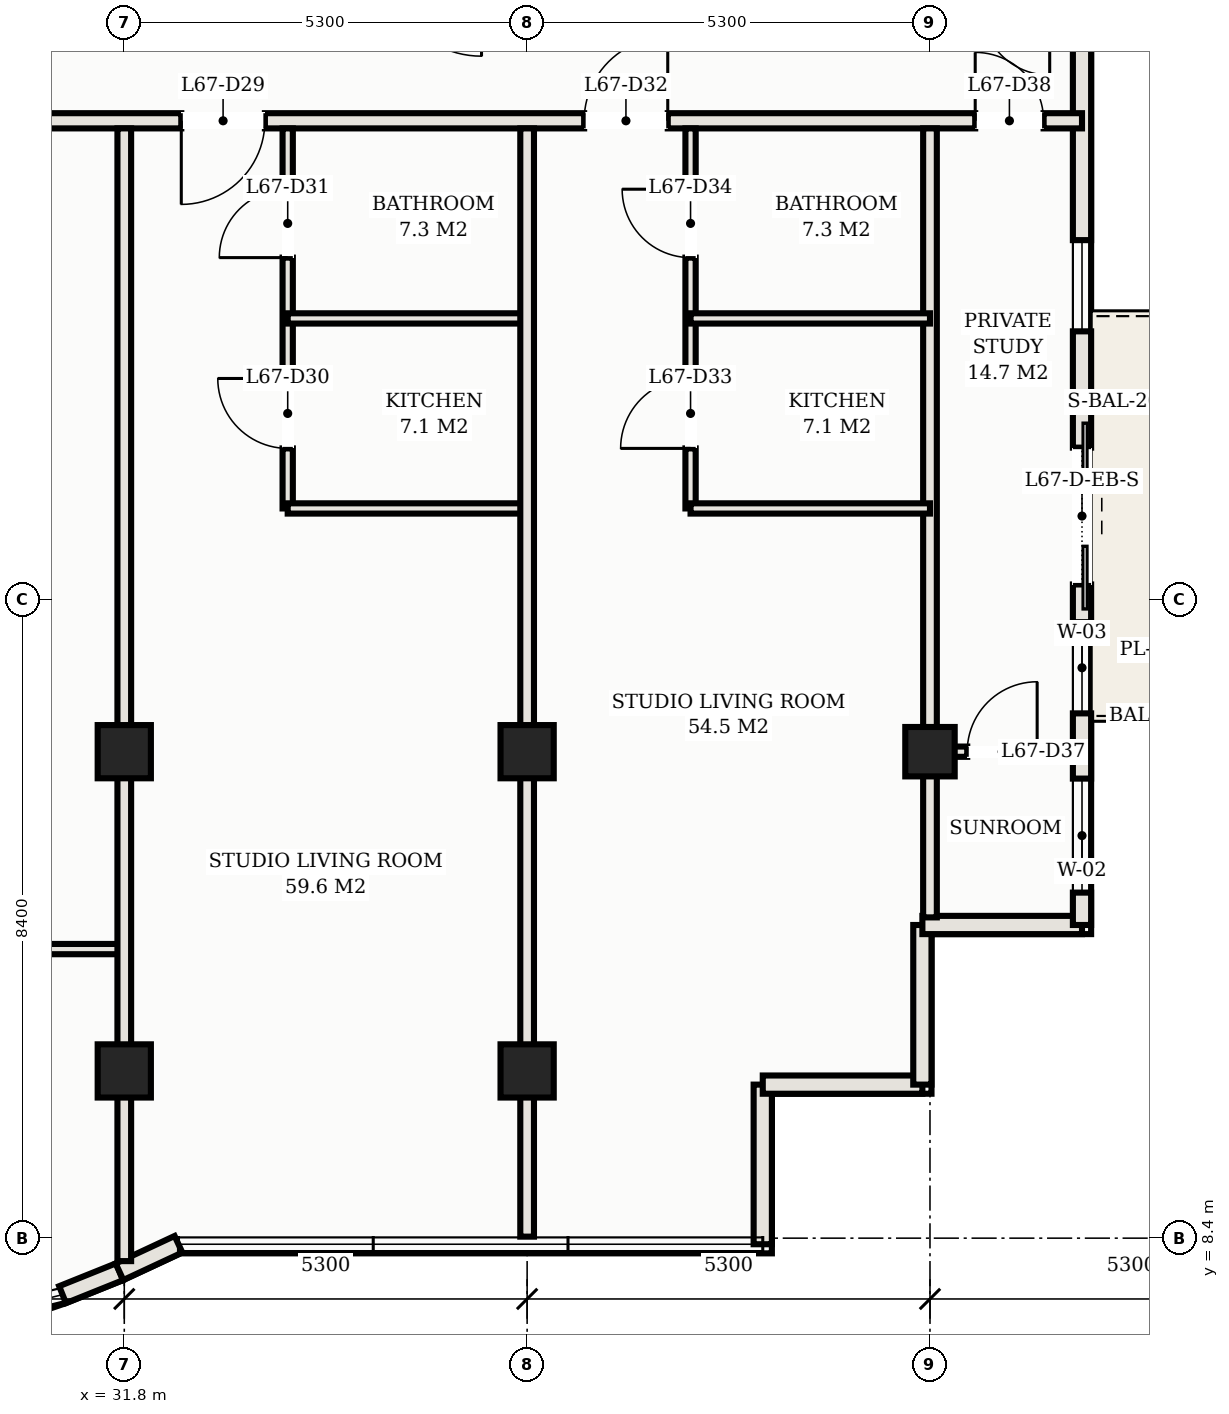
"""IFC4 building model, lengths in metres.
Left out: names, types, materials, properties, quantities, classifications, styles, units other than length and angle.
Written with IfcOpenShell. Run it as: python <this file> out.ifc"""

import sys

from ifc_helpers import new_model, si_unit, direction, frame, frame_2d, origin, origin_2d, place, context, subcontext, project, spatial, rectangle, hollow_rectangle, extrude, element, fill, save


model = new_model("IFC4")
c1 = context("Model", 3, precision=1e-05, world=origin(), true_north=direction((0.0, 1.0)))
c2 = subcontext(c1, "Body", "Model", "MODEL_VIEW")
j1 = project(units=[si_unit("LENGTHUNIT", "METRE"), si_unit("PLANEANGLEUNIT", "RADIAN")], contexts=[c1])
p1 = place(None, origin())
s1 = spatial("IfcSite", under=j1, at=p1, CompositionType="ELEMENT")
p2 = place(p1, origin())
s2 = spatial("IfcBuilding", under=s1, at=p2, CompositionType="ELEMENT")
p3 = place(p2, frame((0.0, 0.0, 242.9)))
s3 = spatial("IfcBuildingStorey", under=s2, at=p3, CompositionType="ELEMENT", Elevation=242.9)
for number, where, z_axis, x_axis in (
    (1, (31.8, 14.8, 0.0), (0.0, 0.0, 1.0), (1.0, 0.0, 0.0)),
    (2, (31.8, 10.6, 0.0), (0.0, 0.0, 1.0), (1.0, 0.0, 0.0)),
    (3, (37.1, 14.8, 0.0), (0.0, 0.0, 1.0), (1.0, 0.0, 0.0)),
    (4, (37.1, 10.6, 0.0), (0.0, 0.0, 1.0), (1.0, 0.0, 0.0)),
):
    element("IfcColumn", number, at=place(p3, frame(where, z_axis=z_axis, x_axis=x_axis)), inside=s3, PredefinedType="COLUMN", context=c2, shape_type="SweptSolid", body=[
        extrude(hollow_rectangle(XDim=0.7, YDim=0.7, WallThickness=0.025, at=origin_2d()), origin(), (0.0, 0.0, 1.0), 3.3),
    ])
p4 = place(p3, frame((42.4, 14.8, 0.0), z_axis=(0.0, 0.0, 1.0), x_axis=(1.0, 0.0, 0.0)))
e5 = element("IfcColumn", 5, at=p4, inside=s3, PredefinedType="COLUMN", context=c2, shape_type="SweptSolid", body=[
    extrude(hollow_rectangle(XDim=0.65, YDim=0.65, WallThickness=0.022, at=origin_2d()), origin(), (0.0, 0.0, 1.0), 3.3),
])
p5 = place(p3, frame((30.988, 7.657, 0.0), z_axis=(0.0, 0.0, 1.0), x_axis=(0.927870589467, 0.372902358805, 0.0)))
e6 = element("IfcWall", 6, at=p5, inside=s3, PredefinedType="SOLIDWALL", context=c2, shape_type="SweptSolid", body=[
    extrude(rectangle(XDim=0.807, YDim=0.24, at=frame_2d((0.404, 0.0))), origin(), (0.0, 0.0, 1.0), 3.11),
])
p6 = place(p3, frame((31.737, 7.958, 0.0), z_axis=(0.0, 0.0, 1.0), x_axis=(0.906190424584, 0.422869855147, 0.0)))
e7 = element("IfcWall", 7, at=p6, inside=s3, PredefinedType="SOLIDWALL", context=c2, shape_type="SweptSolid", body=[
    extrude(rectangle(XDim=0.856, YDim=0.24, at=frame_2d((0.428, 0.0))), origin(), (0.0, 0.0, 1.0), 3.11),
])
p7 = place(p3, frame((40.2, 8.32, 0.0), z_axis=(0.0, 0.0, 1.0), x_axis=(0.0, 1.0, 0.0)))
e8 = element("IfcWall", 8, at=p7, inside=s3, PredefinedType="SOLIDWALL", context=c2, shape_type="SweptSolid", body=[
    extrude(rectangle(XDim=2.1, YDim=0.24, at=frame_2d((1.05, 0.0))), origin(), (0.0, 0.0, 1.0), 3.11),
])
for number, where, z_axis, x_axis in (
    (9, (40.2, 10.42, 0.0), (0.0, 0.0, 1.0), (1.0, 0.0, 0.0)),
    (10, (42.3, 10.42, 0.0), (0.0, 0.0, 1.0), (0.0, 1.0, 0.0)),
):
    element("IfcWall", number, at=place(p3, frame(where, z_axis=z_axis, x_axis=x_axis)), inside=s3, PredefinedType="SOLIDWALL", context=c2, shape_type="SweptSolid", body=[
        extrude(rectangle(XDim=2.1, YDim=0.24, at=frame_2d((1.05, 0.0))), origin(), (0.0, 0.0, 1.0), 3.11),
    ])
p8 = place(p3, frame((42.3, 12.52, 0.0), z_axis=(0.0, 0.0, 1.0), x_axis=(1.0, 0.0, 0.0)))
e11 = element("IfcWall", 11, at=p8, inside=s3, PredefinedType="SOLIDWALL", context=c2, shape_type="SweptSolid", body=[
    extrude(rectangle(XDim=2.1, YDim=0.24, at=frame_2d((1.05, 0.0))), origin(), (0.0, 0.0, 1.0), 3.11),
])
p9 = place(p3, frame((44.4, 12.52, 0.0), z_axis=(0.0, 0.0, 1.0), x_axis=(0.0, 1.0, 0.0)))
e12 = element("IfcWall", 12, at=p9, inside=s3, PredefinedType="SOLIDWALL", context=c2, shape_type="SweptSolid", body=[
    extrude(rectangle(XDim=26.01, YDim=0.24, at=frame_2d((13.005, 0.0))), origin(), (0.0, 0.0, 1.0), 3.11),
])
p10 = place(p9, frame((4.48, 0.0, 0.0)))
e13 = element("IfcOpeningElement", 13, at=p10, cuts=e12, PredefinedType="OPENING", context=c2, shape_type="SweptSolid", body=[
    extrude(rectangle(XDim=1.8, YDim=2.2, at=frame_2d((0.9, 1.1))), frame((0.0, 0.13, 0.0), z_axis=(0.0, -1.0, 0.0), x_axis=(1.0, 0.0, 0.0)), (0.0, 0.0, 1.0), 0.26),
])
p11 = place(p9, frame((0.426, 0.0, 0.75)))
e14 = element("IfcOpeningElement", 14, at=p11, cuts=e12, PredefinedType="OPENING", context=c2, shape_type="SweptSolid", body=[
    extrude(rectangle(XDim=1.5, YDim=1.6, at=frame_2d((0.75, 0.8))), frame((0.0, 0.13, 0.0), z_axis=(0.0, -1.0, 0.0), x_axis=(1.0, 0.0, 0.0)), (0.0, 0.0, 1.0), 0.26),
])
p12 = place(p9, frame((2.784, 0.0, 0.75)))
e15 = element("IfcOpeningElement", 15, at=p12, cuts=e12, PredefinedType="OPENING", context=c2, shape_type="SweptSolid", body=[
    extrude(rectangle(XDim=1.2, YDim=1.5, at=frame_2d((0.6, 0.75))), frame((0.0, 0.13, 0.0), z_axis=(0.0, -1.0, 0.0), x_axis=(1.0, 0.0, 0.0)), (0.0, 0.0, 1.0), 0.26),
])
p13 = place(p9, frame((7.81, 0.0, 0.75)))
e16 = element("IfcOpeningElement", 16, at=p13, cuts=e12, PredefinedType="OPENING", context=c2, shape_type="SweptSolid", body=[
    extrude(rectangle(XDim=1.2, YDim=1.5, at=frame_2d((0.6, 0.75))), frame((0.0, 0.13, 0.0), z_axis=(0.0, -1.0, 0.0), x_axis=(1.0, 0.0, 0.0)), (0.0, 0.0, 1.0), 0.26),
])
p14 = place(p9, frame((18.425, 0.0, 0.75)))
e17 = element("IfcOpeningElement", 17, at=p14, cuts=e12, PredefinedType="OPENING", context=c2, shape_type="SweptSolid", body=[
    extrude(rectangle(XDim=1.2, YDim=1.5, at=frame_2d((0.6, 0.75))), frame((0.0, 0.13, 0.0), z_axis=(0.0, -1.0, 0.0), x_axis=(1.0, 0.0, 0.0)), (0.0, 0.0, 1.0), 0.26),
])
p15 = place(p3, frame((8.6, 23.1, 0.0), z_axis=(0.0, 0.0, 1.0), x_axis=(1.0, 0.0, 0.0)))
e18 = element("IfcWall", 18, at=p15, inside=s3, PredefinedType="PARTITIONING", context=c2, shape_type="SweptSolid", body=[
    extrude(rectangle(XDim=35.8, YDim=0.2, at=frame_2d((17.9, 0.0))), origin(), (0.0, 0.0, 1.0), 2.45),
])
p16 = place(p15, frame((2.75, 0.0, 0.0)))
e19 = element("IfcOpeningElement", 19, at=p16, cuts=e18, PredefinedType="OPENING", context=c2, shape_type="SweptSolid", body=[
    extrude(rectangle(XDim=1.1, YDim=2.25, at=frame_2d((0.55, 1.125))), frame((0.0, 0.11, 0.0), z_axis=(0.0, -1.0, 0.0), x_axis=(1.0, 0.0, 0.0)), (0.0, 0.0, 1.0), 0.22),
])
p17 = place(p15, frame((13.35, 0.0, 0.0)))
e20 = element("IfcOpeningElement", 20, at=p17, cuts=e18, PredefinedType="OPENING", context=c2, shape_type="SweptSolid", body=[
    extrude(rectangle(XDim=1.1, YDim=2.25, at=frame_2d((0.55, 1.125))), frame((0.0, 0.11, 0.0), z_axis=(0.0, -1.0, 0.0), x_axis=(1.0, 0.0, 0.0)), (0.0, 0.0, 1.0), 0.22),
])
p18 = place(p15, frame((23.95, 0.0, 0.0)))
e21 = element("IfcOpeningElement", 21, at=p18, cuts=e18, PredefinedType="OPENING", context=c2, shape_type="SweptSolid", body=[
    extrude(rectangle(XDim=1.1, YDim=2.25, at=frame_2d((0.55, 1.125))), frame((0.0, 0.11, 0.0), z_axis=(0.0, -1.0, 0.0), x_axis=(1.0, 0.0, 0.0)), (0.0, 0.0, 1.0), 0.22),
])
p19 = place(p15, frame((29.25, 0.0, 0.0)))
e22 = element("IfcOpeningElement", 22, at=p19, cuts=e18, PredefinedType="OPENING", context=c2, shape_type="SweptSolid", body=[
    extrude(rectangle(XDim=1.1, YDim=2.25, at=frame_2d((0.55, 1.125))), frame((0.0, 0.11, 0.0), z_axis=(0.0, -1.0, 0.0), x_axis=(1.0, 0.0, 0.0)), (0.0, 0.0, 1.0), 0.22),
])
p20 = place(p15, frame((0.505, 0.0, 0.0)))
e23 = element("IfcOpeningElement", 23, at=p20, cuts=e18, PredefinedType="OPENING", context=c2, shape_type="SweptSolid", body=[
    extrude(rectangle(XDim=0.9, YDim=2.15, at=frame_2d((0.45, 1.075))), frame((0.0, 0.11, 0.0), z_axis=(0.0, -1.0, 0.0), x_axis=(1.0, 0.0, 0.0)), (0.0, 0.0, 1.0), 0.22),
])
p21 = place(p15, frame((34.395, 0.0, 0.0)))
e24 = element("IfcOpeningElement", 24, at=p21, cuts=e18, PredefinedType="OPENING", context=c2, shape_type="SweptSolid", body=[
    extrude(rectangle(XDim=0.9, YDim=2.15, at=frame_2d((0.45, 1.075))), frame((0.0, 0.11, 0.0), z_axis=(0.0, -1.0, 0.0), x_axis=(1.0, 0.0, 0.0)), (0.0, 0.0, 1.0), 0.22),
])
p22 = place(p3, frame((42.4, 12.62, 0.0), z_axis=(0.0, 0.0, 1.0), x_axis=(0.0, 1.0, 0.0)))
e25 = element("IfcWall", 25, at=p22, inside=s3, PredefinedType="PARTITIONING", context=c2, shape_type="SweptSolid", body=[
    extrude(rectangle(XDim=10.38, YDim=0.18, at=frame_2d((5.19, 0.0))), origin(), (0.0, 0.0, 1.0), 2.45),
])
p23 = place(p3, frame((21.2, 12.203, 0.0), z_axis=(0.0, 0.0, 1.0), x_axis=(1.0, 0.0, 0.0)))
e26 = element("IfcWall", 26, at=p23, inside=s3, PredefinedType="PARTITIONING", context=c2, shape_type="SweptSolid", body=[
    extrude(rectangle(XDim=10.6, YDim=0.135, at=frame_2d((5.3, 0.0))), origin(), (0.0, 0.0, 1.0), 2.45),
])
p24 = place(p23, frame((0.615, 0.0, 0.0)))
e27 = element("IfcOpeningElement", 27, at=p24, cuts=e26, PredefinedType="OPENING", context=c2, shape_type="SweptSolid", body=[
    extrude(rectangle(XDim=0.92, YDim=2.15, at=frame_2d((0.46, 1.075))), frame((0.0, 0.078, 0.0), z_axis=(0.0, -1.0, 0.0), x_axis=(1.0, 0.0, 0.0)), (0.0, 0.0, 1.0), 0.155),
])
p25 = place(p3, frame((31.8, 8.098, 0.0), z_axis=(0.0, 0.0, 1.0), x_axis=(0.0, 1.0, 0.0)))
e28 = element("IfcWall", 28, at=p25, inside=s3, PredefinedType="PARTITIONING", context=c2, shape_type="SweptSolid", body=[
    extrude(rectangle(XDim=14.902, YDim=0.18, at=frame_2d((7.451, 0.0))), origin(), (0.0, 0.0, 1.0), 2.45),
])
p26 = place(p3, frame((33.95, 18.0, 0.0), z_axis=(0.0, 0.0, 1.0), x_axis=(0.0, 1.0, 0.0)))
e29 = element("IfcWall", 29, at=p26, inside=s3, PredefinedType="PARTITIONING", context=c2, shape_type="SweptSolid", body=[
    extrude(rectangle(XDim=5.0, YDim=0.135, at=frame_2d((2.5, 0.0))), origin(), (0.0, 0.0, 1.0), 2.45),
])
p27 = place(p26, frame((0.79, 0.0, 0.0)))
e30 = element("IfcOpeningElement", 30, at=p27, cuts=e29, PredefinedType="OPENING", context=c2, shape_type="SweptSolid", body=[
    extrude(rectangle(XDim=0.92, YDim=2.15, at=frame_2d((0.46, 1.075))), frame((0.0, 0.078, 0.0), z_axis=(0.0, -1.0, 0.0), x_axis=(1.0, 0.0, 0.0)), (0.0, 0.0, 1.0), 0.155),
])
p28 = place(p26, frame((3.3, 0.0, 0.0)))
e31 = element("IfcOpeningElement", 31, at=p28, cuts=e29, PredefinedType="OPENING", context=c2, shape_type="SweptSolid", body=[
    extrude(rectangle(XDim=0.9, YDim=2.15, at=frame_2d((0.45, 1.075))), frame((0.0, 0.078, 0.0), z_axis=(0.0, -1.0, 0.0), x_axis=(1.0, 0.0, 0.0)), (0.0, 0.0, 1.0), 0.155),
])
for number, where, z_axis, x_axis in (
    (32, (33.95, 18.0, 0.0), (0.0, 0.0, 1.0), (1.0, 0.0, 0.0)),
    (33, (33.95, 20.5, 0.0), (0.0, 0.0, 1.0), (1.0, 0.0, 0.0)),
):
    element("IfcWall", number, at=place(p3, frame(where, z_axis=z_axis, x_axis=x_axis)), inside=s3, PredefinedType="PARTITIONING", context=c2, shape_type="SweptSolid", body=[
        extrude(rectangle(XDim=3.15, YDim=0.135, at=frame_2d((1.575, 0.0))), origin(), (0.0, 0.0, 1.0), 2.45),
    ])
p29 = place(p3, frame((37.1, 8.42, 0.0), z_axis=(0.0, 0.0, 1.0), x_axis=(0.0, 1.0, 0.0)))
e34 = element("IfcWall", 34, at=p29, inside=s3, PredefinedType="PARTITIONING", context=c2, shape_type="SweptSolid", body=[
    extrude(rectangle(XDim=14.58, YDim=0.18, at=frame_2d((7.29, 0.0))), origin(), (0.0, 0.0, 1.0), 2.45),
])
p30 = place(p3, frame((39.25, 18.0, 0.0), z_axis=(0.0, 0.0, 1.0), x_axis=(0.0, 1.0, 0.0)))
e35 = element("IfcWall", 35, at=p30, inside=s3, PredefinedType="PARTITIONING", context=c2, shape_type="SweptSolid", body=[
    extrude(rectangle(XDim=5.0, YDim=0.135, at=frame_2d((2.5, 0.0))), origin(), (0.0, 0.0, 1.0), 2.45),
])
p31 = place(p30, frame((0.79, 0.0, 0.0)))
e36 = element("IfcOpeningElement", 36, at=p31, cuts=e35, PredefinedType="OPENING", context=c2, shape_type="SweptSolid", body=[
    extrude(rectangle(XDim=0.92, YDim=2.15, at=frame_2d((0.46, 1.075))), frame((0.0, 0.078, 0.0), z_axis=(0.0, -1.0, 0.0), x_axis=(1.0, 0.0, 0.0)), (0.0, 0.0, 1.0), 0.155),
])
p32 = place(p30, frame((3.3, 0.0, 0.0)))
e37 = element("IfcOpeningElement", 37, at=p32, cuts=e35, PredefinedType="OPENING", context=c2, shape_type="SweptSolid", body=[
    extrude(rectangle(XDim=0.9, YDim=2.15, at=frame_2d((0.45, 1.075))), frame((0.0, 0.078, 0.0), z_axis=(0.0, -1.0, 0.0), x_axis=(1.0, 0.0, 0.0)), (0.0, 0.0, 1.0), 0.155),
])
for number, where, z_axis, x_axis in (
    (38, (39.25, 18.0, 0.0), (0.0, 0.0, 1.0), (1.0, 0.0, 0.0)),
    (39, (39.25, 20.5, 0.0), (0.0, 0.0, 1.0), (1.0, 0.0, 0.0)),
):
    element("IfcWall", number, at=place(p3, frame(where, z_axis=z_axis, x_axis=x_axis)), inside=s3, PredefinedType="PARTITIONING", context=c2, shape_type="SweptSolid", body=[
        extrude(rectangle(XDim=3.15, YDim=0.135, at=frame_2d((1.575, 0.0))), origin(), (0.0, 0.0, 1.0), 2.45),
    ])
p33 = place(p3, frame((42.4, 14.8, 0.0), z_axis=(0.0, 0.0, 1.0), x_axis=(1.0, 0.0, 0.0)))
e40 = element("IfcWall", 40, at=p33, inside=s3, PredefinedType="PARTITIONING", context=c2, shape_type="SweptSolid", body=[
    extrude(rectangle(XDim=1.9, YDim=0.135, at=frame_2d((0.95, 0.0))), origin(), (0.0, 0.0, 1.0), 2.45),
])
p34 = place(p33, frame((0.49, 0.0, 0.0)))
e41 = element("IfcOpeningElement", 41, at=p34, cuts=e40, PredefinedType="OPENING", context=c2, shape_type="SweptSolid", body=[
    extrude(rectangle(XDim=0.92, YDim=2.15, at=frame_2d((0.46, 1.075))), frame((0.0, 0.078, 0.0), z_axis=(0.0, -1.0, 0.0), x_axis=(1.0, 0.0, 0.0)), (0.0, 0.0, 1.0), 0.155),
])
p35 = place(p10, frame((1.8, 0.0, 0.0), z_axis=(0.0, 0.0, 1.0), x_axis=(-1.0, 0.0, 0.0)))
e42 = element("IfcDoor", 42, at=p35, inside=s3, OperationType="DOUBLE_DOOR_SLIDING", PredefinedType="DOOR", context=c2, shape_type="SweptSolid", body=[
    extrude(rectangle(XDim=1.8, YDim=2.2, at=frame_2d((0.9, 1.1))), frame((0.0, 0.025, 0.0), z_axis=(0.0, -1.0, 0.0), x_axis=(1.0, 0.0, 0.0)), (0.0, 0.0, 1.0), 0.05),
])
fill(e13, e42)
p36 = place(p11, origin())
e43 = element("IfcWindow", 43, at=p36, inside=s3, PartitioningType="SINGLE_PANEL", PredefinedType="WINDOW", context=c2, shape_type="SweptSolid", body=[
    extrude(rectangle(XDim=1.5, YDim=1.6, at=frame_2d((0.75, 0.8))), frame((0.0, 0.03, 0.0), z_axis=(0.0, -1.0, 0.0), x_axis=(1.0, 0.0, 0.0)), (0.0, 0.0, 1.0), 0.06),
])
fill(e14, e43)
p37 = place(p18, frame((1.1, 0.0, 0.0), z_axis=(0.0, 0.0, 1.0), x_axis=(-1.0, 0.0, 0.0)))
e44 = element("IfcDoor", 44, at=p37, inside=s3, OperationType="SINGLE_SWING_RIGHT", PredefinedType="DOOR", context=c2, shape_type="SweptSolid", body=[
    extrude(rectangle(XDim=1.1, YDim=2.25, at=frame_2d((0.55, 1.125))), frame((0.0, 0.025, 0.0), z_axis=(0.0, -1.0, 0.0), x_axis=(1.0, 0.0, 0.0)), (0.0, 0.0, 1.0), 0.05),
])
fill(e21, e44)
p38 = place(p27, origin())
e45 = element("IfcDoor", 45, at=p38, inside=s3, OperationType="SINGLE_SWING_RIGHT", PredefinedType="DOOR", context=c2, shape_type="SweptSolid", body=[
    extrude(rectangle(XDim=0.92, YDim=2.15, at=frame_2d((0.46, 1.075))), frame((0.0, 0.025, 0.0), z_axis=(0.0, -1.0, 0.0), x_axis=(1.0, 0.0, 0.0)), (0.0, 0.0, 1.0), 0.05),
])
fill(e30, e45)
p39 = place(p28, origin())
e46 = element("IfcDoor", 46, at=p39, inside=s3, OperationType="SINGLE_SWING_LEFT", PredefinedType="DOOR", context=c2, shape_type="SweptSolid", body=[
    extrude(rectangle(XDim=0.9, YDim=2.15, at=frame_2d((0.45, 1.075))), frame((0.0, 0.025, 0.0), z_axis=(0.0, -1.0, 0.0), x_axis=(1.0, 0.0, 0.0)), (0.0, 0.0, 1.0), 0.05),
])
fill(e31, e46)
p40 = place(p19, origin())
e47 = element("IfcDoor", 47, at=p40, inside=s3, OperationType="SINGLE_SWING_RIGHT", PredefinedType="DOOR", context=c2, shape_type="SweptSolid", body=[
    extrude(rectangle(XDim=1.1, YDim=2.25, at=frame_2d((0.55, 1.125))), frame((0.0, 0.025, 0.0), z_axis=(0.0, -1.0, 0.0), x_axis=(1.0, 0.0, 0.0)), (0.0, 0.0, 1.0), 0.05),
])
fill(e22, e47)
p41 = place(p31, origin())
e48 = element("IfcDoor", 48, at=p41, inside=s3, OperationType="SINGLE_SWING_LEFT", PredefinedType="DOOR", context=c2, shape_type="SweptSolid", body=[
    extrude(rectangle(XDim=0.92, YDim=2.15, at=frame_2d((0.46, 1.075))), frame((0.0, 0.025, 0.0), z_axis=(0.0, -1.0, 0.0), x_axis=(1.0, 0.0, 0.0)), (0.0, 0.0, 1.0), 0.05),
])
fill(e36, e48)
p42 = place(p32, origin())
e49 = element("IfcDoor", 49, at=p42, inside=s3, OperationType="SINGLE_SWING_RIGHT", PredefinedType="DOOR", context=c2, shape_type="SweptSolid", body=[
    extrude(rectangle(XDim=0.9, YDim=2.15, at=frame_2d((0.45, 1.075))), frame((0.0, 0.025, 0.0), z_axis=(0.0, -1.0, 0.0), x_axis=(1.0, 0.0, 0.0)), (0.0, 0.0, 1.0), 0.05),
])
fill(e37, e49)
p43 = place(p34, origin())
e50 = element("IfcDoor", 50, at=p43, inside=s3, OperationType="SINGLE_SWING_RIGHT", PredefinedType="DOOR", context=c2, shape_type="SweptSolid", body=[
    extrude(rectangle(XDim=0.92, YDim=2.15, at=frame_2d((0.46, 1.075))), frame((0.0, 0.025, 0.0), z_axis=(0.0, -1.0, 0.0), x_axis=(1.0, 0.0, 0.0)), (0.0, 0.0, 1.0), 0.05),
])
fill(e41, e50)
p44 = place(p21, origin())
e51 = element("IfcDoor", 51, at=p44, inside=s3, OperationType="SINGLE_SWING_LEFT", PredefinedType="DOOR", context=c2, shape_type="SweptSolid", body=[
    extrude(rectangle(XDim=0.9, YDim=2.15, at=frame_2d((0.45, 1.075))), frame((0.0, 0.025, 0.0), z_axis=(0.0, -1.0, 0.0), x_axis=(1.0, 0.0, 0.0)), (0.0, 0.0, 1.0), 0.05),
])
fill(e24, e51)
p45 = place(p12, origin())
e52 = element("IfcWindow", 52, at=p45, inside=s3, PartitioningType="SINGLE_PANEL", PredefinedType="WINDOW", context=c2, shape_type="SweptSolid", body=[
    extrude(rectangle(XDim=1.2, YDim=1.5, at=frame_2d((0.6, 0.75))), frame((0.0, 0.03, 0.0), z_axis=(0.0, -1.0, 0.0), x_axis=(1.0, 0.0, 0.0)), (0.0, 0.0, 1.0), 0.06),
])
fill(e15, e52)
p46 = place(p13, origin())
e53 = element("IfcWindow", 53, at=p46, inside=s3, PartitioningType="SINGLE_PANEL", PredefinedType="WINDOW", context=c2, shape_type="SweptSolid", body=[
    extrude(rectangle(XDim=1.2, YDim=1.5, at=frame_2d((0.6, 0.75))), frame((0.0, 0.03, 0.0), z_axis=(0.0, -1.0, 0.0), x_axis=(1.0, 0.0, 0.0)), (0.0, 0.0, 1.0), 0.06),
])
fill(e16, e53)
save(model, sys.argv[1])
